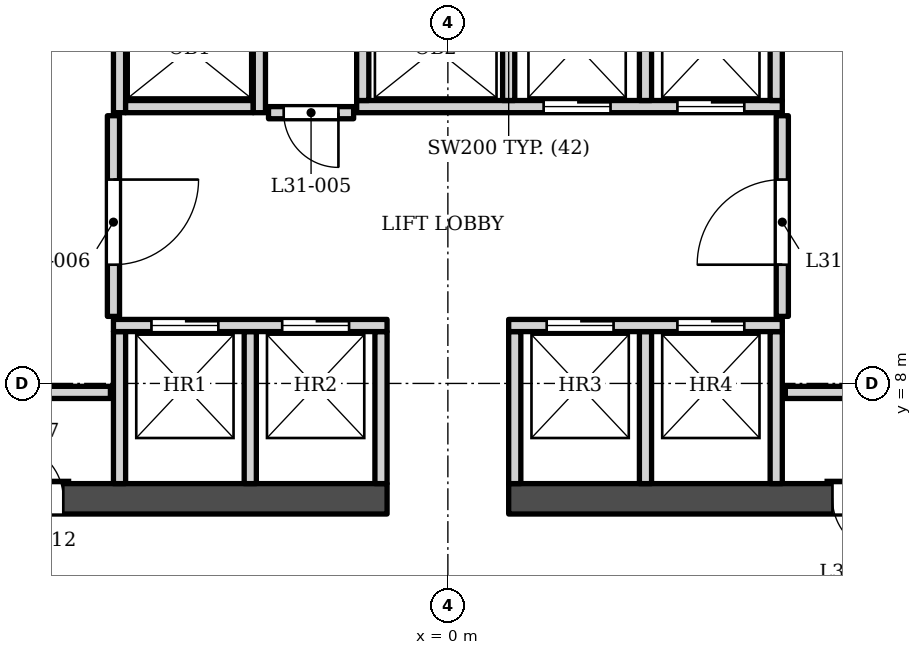
"""IFC4 building model, lengths in metres.
Left out: names, types, materials, properties, quantities, classifications, styles, units other than length and angle.
Written with IfcOpenShell. Run it as: python <this file> out.ifc"""

import sys

from ifc_helpers import new_model, si_unit, direction, frame, frame_2d, origin, place, context, subcontext, project, spatial, rectangle, extrude, element, fill, save


model = new_model("IFC4")
c1 = context("Model", 3, precision=1e-05, world=origin(), true_north=direction((0.0, 1.0)))
c2 = subcontext(c1, "Body", "Model", "MODEL_VIEW")
j1 = project(units=[si_unit("LENGTHUNIT", "METRE"), si_unit("PLANEANGLEUNIT", "RADIAN")], contexts=[c1])
p1 = place(None, origin())
s1 = spatial("IfcSite", under=j1, at=p1, CompositionType="ELEMENT")
p2 = place(p1, origin())
s2 = spatial("IfcBuilding", under=s1, at=p2, CompositionType="ELEMENT")
p3 = place(p2, frame((0.0, 0.0, 132.6)))
s3 = spatial("IfcBuildingStorey", under=s2, at=p3, CompositionType="ELEMENT", Elevation=132.6)
p4 = place(p3, frame((-8.05, 6.103, 0.0), z_axis=(0.0, 0.0, 1.0), x_axis=(1.0, 0.0, 0.0)))
e1 = element("IfcWall", 1, at=p4, inside=s3, PredefinedType="SHEAR", context=c2, shape_type="SweptSolid", body=[
    extrude(rectangle(XDim=7.05, YDim=0.5, at=frame_2d((3.525, 0.0))), origin(), (0.0, 0.0, 1.0), 7.0),
])
p5 = place(p4, frame((0.825, 0.0, 0.0)))
e2 = element("IfcOpeningElement", 2, at=p5, cuts=e1, PredefinedType="OPENING", context=c2, shape_type="SweptSolid", body=[
    extrude(rectangle(XDim=0.9, YDim=2.1, at=frame_2d((0.45, 1.05))), frame((0.0, 0.26, 0.0), z_axis=(0.0, -1.0, 0.0), x_axis=(1.0, 0.0, 0.0)), (0.0, 0.0, 1.0), 0.52),
])
p6 = place(p3, frame((1.0, 6.103, 0.0), z_axis=(0.0, 0.0, 1.0), x_axis=(1.0, 0.0, 0.0)))
e3 = element("IfcWall", 3, at=p6, inside=s3, PredefinedType="SHEAR", context=c2, shape_type="SweptSolid", body=[
    extrude(rectangle(XDim=7.05, YDim=0.5, at=frame_2d((3.525, 0.0))), origin(), (0.0, 0.0, 1.0), 7.0),
])
p7 = place(p6, frame((5.325, 0.0, 0.0)))
e4 = element("IfcOpeningElement", 4, at=p7, cuts=e3, PredefinedType="OPENING", context=c2, shape_type="SweptSolid", body=[
    extrude(rectangle(XDim=0.9, YDim=2.1, at=frame_2d((0.45, 1.05))), frame((0.0, 0.26, 0.0), z_axis=(0.0, -1.0, 0.0), x_axis=(1.0, 0.0, 0.0)), (0.0, 0.0, 1.0), 0.52),
])
for number, where, z_axis, x_axis in (
    (5, (-5.4, 6.353, 0.0), (0.0, 0.0, 1.0), (0.0, 1.0, 0.0)),
    (6, (-3.25, 6.353, 0.0), (0.0, 0.0, 1.0), (0.0, 1.0, 0.0)),
    (7, (-1.1, 6.353, 0.0), (0.0, 0.0, 1.0), (0.0, 1.0, 0.0)),
    (8, (1.1, 6.353, 0.0), (0.0, 0.0, 1.0), (0.0, 1.0, 0.0)),
    (9, (3.25, 6.353, 0.0), (0.0, 0.0, 1.0), (0.0, 1.0, 0.0)),
    (10, (5.4, 6.353, 0.0), (0.0, 0.0, 1.0), (0.0, 1.0, 0.0)),
    (11, (-8.05, 7.853, 0.0), (0.0, 0.0, 1.0), (1.0, 0.0, 0.0)),
    (12, (5.55, 7.853, 0.0), (0.0, 0.0, 1.0), (1.0, 0.0, 0.0)),
):
    element("IfcWall", number, at=place(p3, frame(where, z_axis=z_axis, x_axis=x_axis)), inside=s3, PredefinedType="SOLIDWALL", context=c2, shape_type="SweptSolid", body=[
        extrude(rectangle(XDim=2.5, YDim=0.2, at=frame_2d((1.25, 0.0))), origin(), (0.0, 0.0, 1.0), 6.7),
    ])
p8 = place(p3, frame((-5.5, 8.953, 0.0), z_axis=(0.0, 0.0, 1.0), x_axis=(1.0, 0.0, 0.0)))
e13 = element("IfcWall", 13, at=p8, inside=s3, PredefinedType="SOLIDWALL", context=c2, shape_type="SweptSolid", body=[
    extrude(rectangle(XDim=4.5, YDim=0.2, at=frame_2d((2.25, 0.0))), origin(), (0.0, 0.0, 1.0), 6.7),
])
p9 = place(p8, frame((0.625, 0.0, 0.0)))
e14 = element("IfcOpeningElement", 14, at=p9, cuts=e13, PredefinedType="OPENING", context=c2, shape_type="SweptSolid", body=[
    extrude(rectangle(XDim=1.1, YDim=2.1, at=frame_2d((0.55, 1.05))), frame((0.0, 0.11, 0.0), z_axis=(0.0, -1.0, 0.0), x_axis=(1.0, 0.0, 0.0)), (0.0, 0.0, 1.0), 0.22),
])
p10 = place(p8, frame((2.775, 0.0, 0.0)))
e15 = element("IfcOpeningElement", 15, at=p10, cuts=e13, PredefinedType="OPENING", context=c2, shape_type="SweptSolid", body=[
    extrude(rectangle(XDim=1.1, YDim=2.1, at=frame_2d((0.55, 1.05))), frame((0.0, 0.11, 0.0), z_axis=(0.0, -1.0, 0.0), x_axis=(1.0, 0.0, 0.0)), (0.0, 0.0, 1.0), 0.22),
])
p11 = place(p3, frame((1.0, 8.953, 0.0), z_axis=(0.0, 0.0, 1.0), x_axis=(1.0, 0.0, 0.0)))
e16 = element("IfcWall", 16, at=p11, inside=s3, PredefinedType="SOLIDWALL", context=c2, shape_type="SweptSolid", body=[
    extrude(rectangle(XDim=4.5, YDim=0.2, at=frame_2d((2.25, 0.0))), origin(), (0.0, 0.0, 1.0), 6.7),
])
p12 = place(p11, frame((0.625, 0.0, 0.0)))
e17 = element("IfcOpeningElement", 17, at=p12, cuts=e16, PredefinedType="OPENING", context=c2, shape_type="SweptSolid", body=[
    extrude(rectangle(XDim=1.1, YDim=2.1, at=frame_2d((0.55, 1.05))), frame((0.0, 0.11, 0.0), z_axis=(0.0, -1.0, 0.0), x_axis=(1.0, 0.0, 0.0)), (0.0, 0.0, 1.0), 0.22),
])
p13 = place(p11, frame((2.775, 0.0, 0.0)))
e18 = element("IfcOpeningElement", 18, at=p13, cuts=e16, PredefinedType="OPENING", context=c2, shape_type="SweptSolid", body=[
    extrude(rectangle(XDim=1.1, YDim=2.1, at=frame_2d((0.55, 1.05))), frame((0.0, 0.11, 0.0), z_axis=(0.0, -1.0, 0.0), x_axis=(1.0, 0.0, 0.0)), (0.0, 0.0, 1.0), 0.22),
])
p14 = place(p3, frame((-5.5, 9.103, 0.0), z_axis=(0.0, 0.0, 1.0), x_axis=(0.0, 1.0, 0.0)))
e19 = element("IfcWall", 19, at=p14, inside=s3, PredefinedType="SOLIDWALL", context=c2, shape_type="SweptSolid", body=[
    extrude(rectangle(XDim=3.3, YDim=0.2, at=frame_2d((1.65, 0.0))), origin(), (0.0, 0.0, 1.0), 6.7),
])
p15 = place(p14, frame((0.85, 0.0, 0.0)))
e20 = element("IfcOpeningElement", 20, at=p15, cuts=e19, PredefinedType="OPENING", context=c2, shape_type="SweptSolid", body=[
    extrude(rectangle(XDim=1.4, YDim=2.1, at=frame_2d((0.7, 1.05))), frame((0.0, 0.11, 0.0), z_axis=(0.0, -1.0, 0.0), x_axis=(1.0, 0.0, 0.0)), (0.0, 0.0, 1.0), 0.22),
])
p16 = place(p3, frame((5.5, 9.103, 0.0), z_axis=(0.0, 0.0, 1.0), x_axis=(0.0, 1.0, 0.0)))
e21 = element("IfcWall", 21, at=p16, inside=s3, PredefinedType="SOLIDWALL", context=c2, shape_type="SweptSolid", body=[
    extrude(rectangle(XDim=3.3, YDim=0.2, at=frame_2d((1.65, 0.0))), origin(), (0.0, 0.0, 1.0), 6.7),
])
p17 = place(p16, frame((0.85, 0.0, 0.0)))
e22 = element("IfcOpeningElement", 22, at=p17, cuts=e21, PredefinedType="OPENING", context=c2, shape_type="SweptSolid", body=[
    extrude(rectangle(XDim=1.4, YDim=2.1, at=frame_2d((0.7, 1.05))), frame((0.0, 0.11, 0.0), z_axis=(0.0, -1.0, 0.0), x_axis=(1.0, 0.0, 0.0)), (0.0, 0.0, 1.0), 0.22),
])
p18 = place(p3, frame((-2.95, 12.453, 0.0), z_axis=(0.0, 0.0, 1.0), x_axis=(1.0, 0.0, 0.0)))
e23 = element("IfcWall", 23, at=p18, inside=s3, PredefinedType="SOLIDWALL", context=c2, shape_type="SweptSolid", body=[
    extrude(rectangle(XDim=1.4, YDim=0.2, at=frame_2d((0.7, 0.0))), origin(), (0.0, 0.0, 1.0), 6.7),
])
p19 = place(p18, frame((0.25, 0.0, 0.0)))
e24 = element("IfcOpeningElement", 24, at=p19, cuts=e23, PredefinedType="OPENING", context=c2, shape_type="SweptSolid", body=[
    extrude(rectangle(XDim=0.9, YDim=2.1, at=frame_2d((0.45, 1.05))), frame((0.0, 0.11, 0.0), z_axis=(0.0, -1.0, 0.0), x_axis=(1.0, 0.0, 0.0)), (0.0, 0.0, 1.0), 0.22),
])
p20 = place(p3, frame((-5.4, 12.453, 0.0), z_axis=(0.0, 0.0, 1.0), x_axis=(0.0, 1.0, 0.0)))
e25 = element("IfcWall", 25, at=p20, inside=s3, PredefinedType="SOLIDWALL", context=c2, shape_type="SweptSolid", body=[
    extrude(rectangle(XDim=3.0, YDim=0.2, at=frame_2d((1.5, 0.0))), origin(), (0.0, 0.0, 1.0), 6.7),
])
p21 = place(p3, frame((-5.3, 12.552, 0.0), z_axis=(0.0, 0.0, 1.0), x_axis=(1.0, 0.0, 0.0)))
e26 = element("IfcWall", 26, at=p21, inside=s3, PredefinedType="SOLIDWALL", context=c2, shape_type="SweptSolid", body=[
    extrude(rectangle(XDim=2.1, YDim=0.2, at=frame_2d((1.05, 0.0))), origin(), (0.0, 0.0, 1.0), 6.7),
])
p22 = place(p3, frame((-3.1, 12.453, 0.0), z_axis=(0.0, 0.0, 1.0), x_axis=(0.0, 1.0, 0.0)))
e27 = element("IfcWall", 27, at=p22, inside=s3, PredefinedType="SOLIDWALL", context=c2, shape_type="SweptSolid", body=[
    extrude(rectangle(XDim=3.0, YDim=0.2, at=frame_2d((1.5, 0.0))), origin(), (0.0, 0.0, 1.0), 6.7),
])
p23 = place(p3, frame((-1.5, 12.552, 0.0), z_axis=(0.0, 0.0, 1.0), x_axis=(1.0, 0.0, 0.0)))
e28 = element("IfcWall", 28, at=p23, inside=s3, PredefinedType="SOLIDWALL", context=c2, shape_type="SweptSolid", body=[
    extrude(rectangle(XDim=7.0, YDim=0.2, at=frame_2d((3.5, 0.0))), origin(), (0.0, 0.0, 1.0), 6.7),
])
p24 = place(p23, frame((3.075, 0.0, 0.0)))
e29 = element("IfcOpeningElement", 29, at=p24, cuts=e28, PredefinedType="OPENING", context=c2, shape_type="SweptSolid", body=[
    extrude(rectangle(XDim=1.1, YDim=2.1, at=frame_2d((0.55, 1.05))), frame((0.0, 0.11, 0.0), z_axis=(0.0, -1.0, 0.0), x_axis=(1.0, 0.0, 0.0)), (0.0, 0.0, 1.0), 0.22),
])
p25 = place(p23, frame((5.275, 0.0, 0.0)))
e30 = element("IfcOpeningElement", 30, at=p25, cuts=e28, PredefinedType="OPENING", context=c2, shape_type="SweptSolid", body=[
    extrude(rectangle(XDim=1.1, YDim=2.1, at=frame_2d((0.55, 1.05))), frame((0.0, 0.11, 0.0), z_axis=(0.0, -1.0, 0.0), x_axis=(1.0, 0.0, 0.0)), (0.0, 0.0, 1.0), 0.22),
])
for number, where, z_axis, x_axis in (
    (31, (-1.4, 12.653, 0.0), (0.0, 0.0, 1.0), (0.0, 1.0, 0.0)),
    (32, (1.0, 12.653, 0.0), (0.0, 0.0, 1.0), (0.0, 1.0, 0.0)),
    (33, (3.25, 12.653, 0.0), (0.0, 0.0, 1.0), (0.0, 1.0, 0.0)),
):
    element("IfcWall", number, at=place(p3, frame(where, z_axis=z_axis, x_axis=x_axis)), inside=s3, PredefinedType="SOLIDWALL", context=c2, shape_type="SweptSolid", body=[
        extrude(rectangle(XDim=2.6, YDim=0.2, at=frame_2d((1.3, 0.0))), origin(), (0.0, 0.0, 1.0), 6.7),
    ])
p26 = place(p3, frame((5.4, 12.653, 0.0), z_axis=(0.0, 0.0, 1.0), x_axis=(0.0, 1.0, 0.0)))
e34 = element("IfcWall", 34, at=p26, inside=s3, PredefinedType="SOLIDWALL", context=c2, shape_type="SweptSolid", body=[
    extrude(rectangle(XDim=1.6, YDim=0.2, at=frame_2d((0.8, 0.0))), origin(), (0.0, 0.0, 1.0), 6.7),
])
p27 = place(p9, origin())
e35 = element("IfcDoor", 35, at=p27, inside=s3, OperationType="DOUBLE_DOOR_SLIDING", PredefinedType="DOOR", context=c2, shape_type="SweptSolid", body=[
    extrude(rectangle(XDim=1.1, YDim=2.1, at=frame_2d((0.55, 1.05))), frame((0.0, 0.025, 0.0), z_axis=(0.0, -1.0, 0.0), x_axis=(1.0, 0.0, 0.0)), (0.0, 0.0, 1.0), 0.05),
])
fill(e14, e35)
p28 = place(p10, origin())
e36 = element("IfcDoor", 36, at=p28, inside=s3, OperationType="DOUBLE_DOOR_SLIDING", PredefinedType="DOOR", context=c2, shape_type="SweptSolid", body=[
    extrude(rectangle(XDim=1.1, YDim=2.1, at=frame_2d((0.55, 1.05))), frame((0.0, 0.025, 0.0), z_axis=(0.0, -1.0, 0.0), x_axis=(1.0, 0.0, 0.0)), (0.0, 0.0, 1.0), 0.05),
])
fill(e15, e36)
p29 = place(p12, origin())
e37 = element("IfcDoor", 37, at=p29, inside=s3, OperationType="DOUBLE_DOOR_SLIDING", PredefinedType="DOOR", context=c2, shape_type="SweptSolid", body=[
    extrude(rectangle(XDim=1.1, YDim=2.1, at=frame_2d((0.55, 1.05))), frame((0.0, 0.025, 0.0), z_axis=(0.0, -1.0, 0.0), x_axis=(1.0, 0.0, 0.0)), (0.0, 0.0, 1.0), 0.05),
])
fill(e17, e37)
p30 = place(p13, origin())
e38 = element("IfcDoor", 38, at=p30, inside=s3, OperationType="DOUBLE_DOOR_SLIDING", PredefinedType="DOOR", context=c2, shape_type="SweptSolid", body=[
    extrude(rectangle(XDim=1.1, YDim=2.1, at=frame_2d((0.55, 1.05))), frame((0.0, 0.025, 0.0), z_axis=(0.0, -1.0, 0.0), x_axis=(1.0, 0.0, 0.0)), (0.0, 0.0, 1.0), 0.05),
])
fill(e18, e38)
p31 = place(p24, origin())
e39 = element("IfcDoor", 39, at=p31, inside=s3, OperationType="DOUBLE_DOOR_SLIDING", PredefinedType="DOOR", context=c2, shape_type="SweptSolid", body=[
    extrude(rectangle(XDim=1.1, YDim=2.1, at=frame_2d((0.55, 1.05))), frame((0.0, 0.025, 0.0), z_axis=(0.0, -1.0, 0.0), x_axis=(1.0, 0.0, 0.0)), (0.0, 0.0, 1.0), 0.05),
])
fill(e29, e39)
p32 = place(p25, origin())
e40 = element("IfcDoor", 40, at=p32, inside=s3, OperationType="DOUBLE_DOOR_SLIDING", PredefinedType="DOOR", context=c2, shape_type="SweptSolid", body=[
    extrude(rectangle(XDim=1.1, YDim=2.1, at=frame_2d((0.55, 1.05))), frame((0.0, 0.025, 0.0), z_axis=(0.0, -1.0, 0.0), x_axis=(1.0, 0.0, 0.0)), (0.0, 0.0, 1.0), 0.05),
])
fill(e30, e40)
p33 = place(p19, origin())
e41 = element("IfcDoor", 41, at=p33, inside=s3, OperationType="SINGLE_SWING_RIGHT", PredefinedType="DOOR", context=c2, shape_type="SweptSolid", body=[
    extrude(rectangle(XDim=0.9, YDim=2.1, at=frame_2d((0.45, 1.05))), frame((0.0, 0.025, 0.0), z_axis=(0.0, -1.0, 0.0), x_axis=(1.0, 0.0, 0.0)), (0.0, 0.0, 1.0), 0.05),
])
fill(e24, e41)
p34 = place(p15, origin())
e42 = element("IfcDoor", 42, at=p34, inside=s3, OperationType="SINGLE_SWING_RIGHT", PredefinedType="DOOR", context=c2, shape_type="SweptSolid", body=[
    extrude(rectangle(XDim=1.4, YDim=2.1, at=frame_2d((0.7, 1.05))), frame((0.0, 0.025, 0.0), z_axis=(0.0, -1.0, 0.0), x_axis=(1.0, 0.0, 0.0)), (0.0, 0.0, 1.0), 0.05),
])
fill(e20, e42)
p35 = place(p17, origin())
e43 = element("IfcDoor", 43, at=p35, inside=s3, OperationType="SINGLE_SWING_LEFT", PredefinedType="DOOR", context=c2, shape_type="SweptSolid", body=[
    extrude(rectangle(XDim=1.4, YDim=2.1, at=frame_2d((0.7, 1.05))), frame((0.0, 0.025, 0.0), z_axis=(0.0, -1.0, 0.0), x_axis=(1.0, 0.0, 0.0)), (0.0, 0.0, 1.0), 0.05),
])
fill(e22, e43)
p36 = place(p5, origin())
e44 = element("IfcDoor", 44, at=p36, inside=s3, OperationType="SINGLE_SWING_LEFT", PredefinedType="DOOR", context=c2, shape_type="SweptSolid", body=[
    extrude(rectangle(XDim=0.9, YDim=2.1, at=frame_2d((0.45, 1.05))), frame((0.0, 0.025, 0.0), z_axis=(0.0, -1.0, 0.0), x_axis=(1.0, 0.0, 0.0)), (0.0, 0.0, 1.0), 0.05),
])
fill(e2, e44)
p37 = place(p7, origin())
e45 = element("IfcDoor", 45, at=p37, inside=s3, OperationType="SINGLE_SWING_RIGHT", PredefinedType="DOOR", context=c2, shape_type="SweptSolid", body=[
    extrude(rectangle(XDim=0.9, YDim=2.1, at=frame_2d((0.45, 1.05))), frame((0.0, 0.025, 0.0), z_axis=(0.0, -1.0, 0.0), x_axis=(1.0, 0.0, 0.0)), (0.0, 0.0, 1.0), 0.05),
])
fill(e4, e45)
save(model, sys.argv[1])
